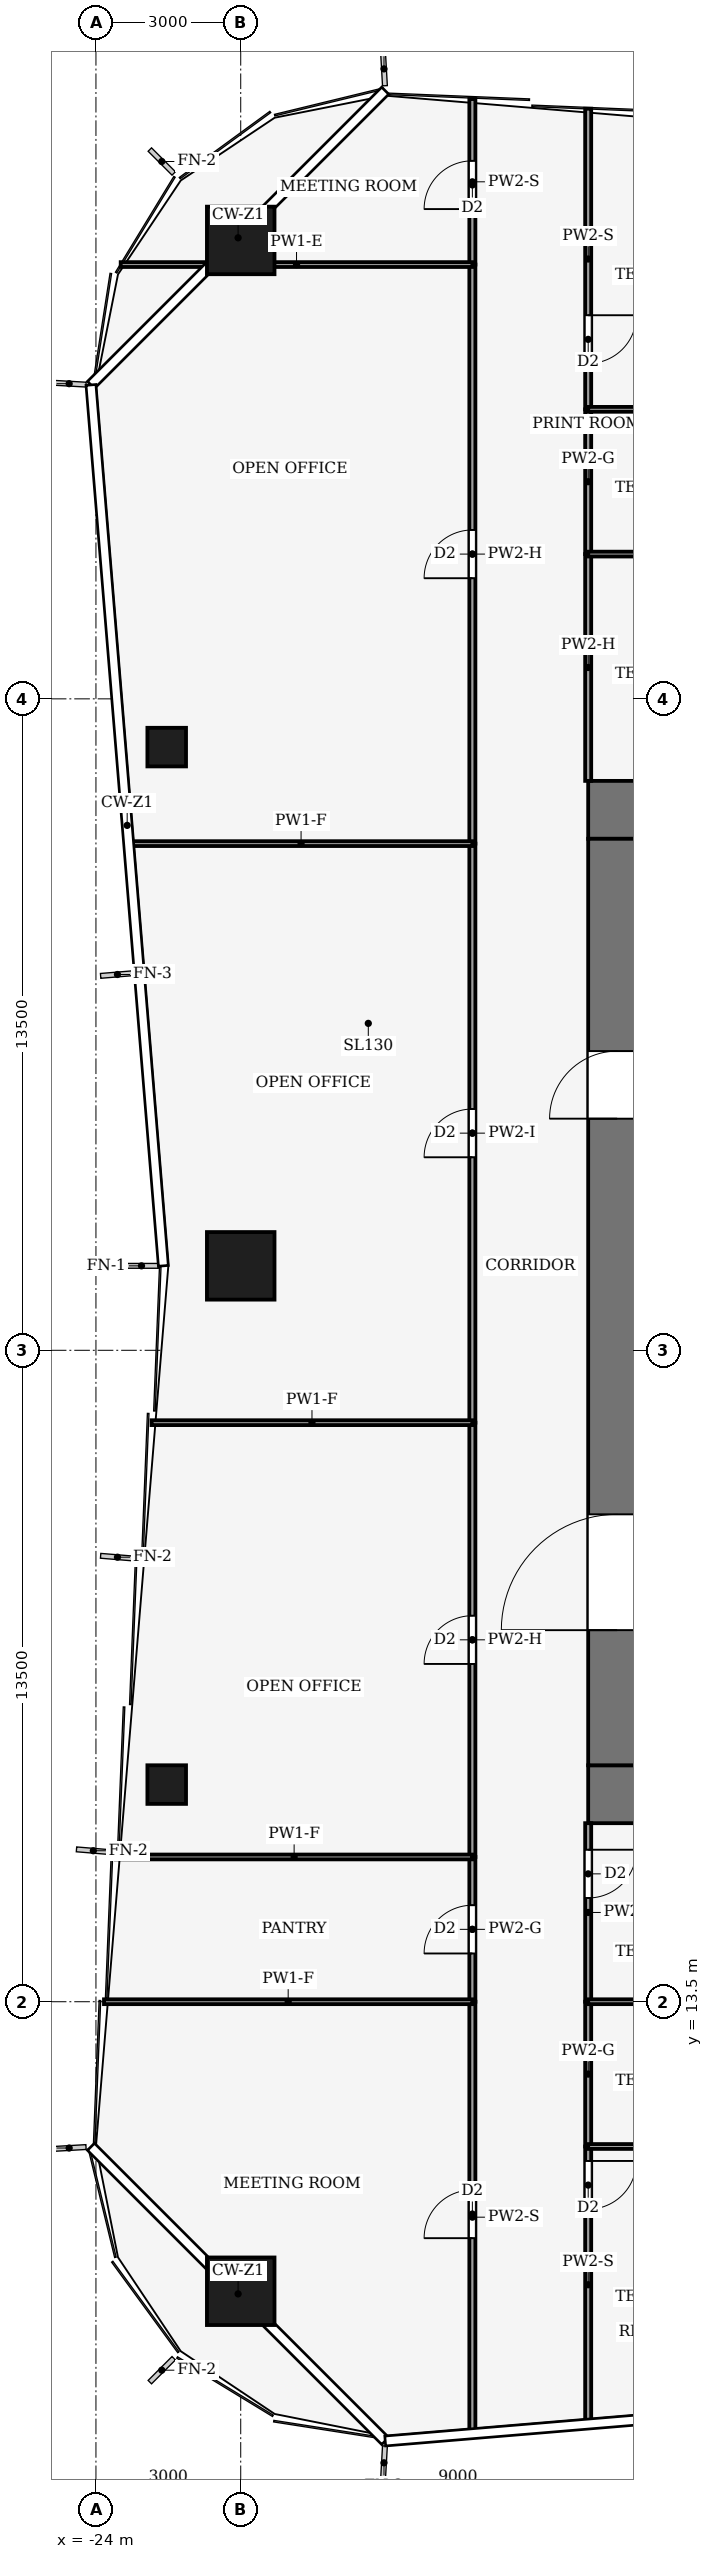
"""IFC4 building model, lengths in metres.
Left out: names, types, materials, properties, quantities, classifications, styles, units other than length and angle.
Written with IfcOpenShell. Run it as: python <this file> out.ifc"""

import sys

from ifc_helpers import new_model, si_unit, direction, frame, frame_2d, origin, origin_2d, place, context, subcontext, project, spatial, rectangle, hollow_rectangle, extrude, element, fill, save


model = new_model("IFC4")
c1 = context("Model", 3, precision=1e-05, world=origin(), true_north=direction((0.0, 1.0)))
c2 = subcontext(c1, "Body", "Model", "MODEL_VIEW")
j1 = project(units=[si_unit("LENGTHUNIT", "METRE"), si_unit("PLANEANGLEUNIT", "RADIAN")], contexts=[c1])
p1 = place(None, origin())
s1 = spatial("IfcSite", under=j1, at=p1, CompositionType="ELEMENT")
p2 = place(p1, origin())
s2 = spatial("IfcBuilding", under=s1, at=p2, CompositionType="ELEMENT")
p3 = place(p2, frame((0.0, 0.0, 82.0)))
s3 = spatial("IfcBuildingStorey", under=s2, at=p3, CompositionType="ELEMENT", Elevation=82.0)
for number, where, z_axis, x_axis in (
    (1, (-13.8, 17.8, -0.13), (0.0, 0.0, 1.0), (1.0, 0.0, 0.0)),
    (2, (-13.8, 38.2, -0.13), (0.0, 0.0, 1.0), (1.0, 0.0, 0.0)),
):
    element("IfcWall", number, at=place(p3, frame(where, z_axis=z_axis, x_axis=x_axis)), inside=s3, PredefinedType="SHEAR", context=c2, shape_type="SweptSolid", body=[
        extrude(rectangle(XDim=27.6, YDim=1.2, at=frame_2d((13.8, 0.0))), origin(), (0.0, 0.0, 1.0), 4.0),
    ])
p4 = place(p3, frame((-13.2, 18.4, -0.13), z_axis=(0.0, 0.0, 1.0), x_axis=(0.0, 1.0, 0.0)))
e3 = element("IfcWall", 3, at=p4, inside=s3, PredefinedType="SHEAR", context=c2, shape_type="SweptSolid", body=[
    extrude(rectangle(XDim=19.2, YDim=1.2, at=frame_2d((9.6, 0.0))), origin(), (0.0, 0.0, 1.0), 4.0),
])
p5 = place(p4, frame((2.8, 0.0, 0.13)))
e4 = element("IfcOpeningElement", 4, at=p5, cuts=e3, PredefinedType="OPENING", context=c2, shape_type="SweptSolid", body=[
    extrude(rectangle(XDim=2.4, YDim=2.4, at=frame_2d((1.2, 1.2))), frame((0.0, 0.61, 0.0), z_axis=(0.0, -1.0, 0.0), x_axis=(1.0, 0.0, 0.0)), (0.0, 0.0, 1.0), 1.22),
])
p6 = place(p4, frame((13.4, 0.0, 0.13)))
e5 = element("IfcOpeningElement", 5, at=p6, cuts=e3, PredefinedType="OPENING", context=c2, shape_type="SweptSolid", body=[
    extrude(rectangle(XDim=1.4, YDim=2.2, at=frame_2d((0.7, 1.1))), frame((0.0, 0.61, 0.0), z_axis=(0.0, -1.0, 0.0), x_axis=(1.0, 0.0, 0.0)), (0.0, 0.0, 1.0), 1.22),
])
for number, where, z_axis, x_axis in (
    (6, (-21.0, 50.0, 0.0), (0.0, 0.0, 1.0), (1.0, 0.0, 0.0)),
    (7, (-21.0, 7.5, 0.0), (0.0, 0.0, 1.0), (1.0, 0.0, 0.0)),
    (8, (-21.0, 28.75, 0.0), (0.0, 0.0, 1.0), (1.0, 0.0, 0.0)),
):
    element("IfcColumn", number, at=place(p3, frame(where, z_axis=z_axis, x_axis=x_axis)), inside=s3, PredefinedType="COLUMN", context=c2, shape_type="SweptSolid", body=[
        extrude(hollow_rectangle(XDim=1.4, YDim=1.4, WallThickness=0.08, at=origin_2d()), origin(), (0.0, 0.0, 1.0), 4.0),
    ])
for number, where, z_axis, x_axis in (
    (9, (-22.534, 18.0, 0.0), (0.0, 0.0, 1.0), (1.0, 0.0, 0.0)),
    (10, (-22.534, 39.5, 0.0), (0.0, 0.0, 1.0), (1.0, 0.0, 0.0)),
):
    element("IfcColumn", number, at=place(p3, frame(where, z_axis=z_axis, x_axis=x_axis)), inside=s3, PredefinedType="COLUMN", context=c2, shape_type="SweptSolid", body=[
        extrude(hollow_rectangle(XDim=0.8, YDim=0.8, WallThickness=0.04, at=origin_2d()), origin(), (0.0, 0.0, 1.0), 4.0),
    ])
p7 = place(p3, frame((-16.2, 4.57, 0.0), z_axis=(0.0, 0.0, 1.0), x_axis=(0.0, 1.0, 0.0)))
e11 = element("IfcWall", 11, at=p7, inside=s3, PredefinedType="PARTITIONING", context=c2, shape_type="SweptSolid", body=[
    extrude(rectangle(XDim=8.93, YDim=0.125, at=frame_2d((4.465, 0.0))), origin(), (0.0, 0.0, 1.0), 3.04),
])
p8 = place(p7, frame((4.03, 0.0, 0.0)))
e12 = element("IfcOpeningElement", 12, at=p8, cuts=e11, PredefinedType="OPENING", context=c2, shape_type="SweptSolid", body=[
    extrude(rectangle(XDim=1.0, YDim=2.1, at=frame_2d((0.5, 1.05))), frame((0.0, 0.073, 0.0), z_axis=(0.0, -1.0, 0.0), x_axis=(1.0, 0.0, 0.0)), (0.0, 0.0, 1.0), 0.145),
])
p9 = place(p3, frame((-16.2, 13.5, 0.0), z_axis=(0.0, 0.0, 1.0), x_axis=(0.0, 1.0, 0.0)))
e13 = element("IfcWall", 13, at=p9, inside=s3, PredefinedType="PARTITIONING", context=c2, shape_type="SweptSolid", body=[
    extrude(rectangle(XDim=3.0, YDim=0.125, at=frame_2d((1.5, 0.0))), origin(), (0.0, 0.0, 1.0), 3.87),
])
p10 = place(p9, frame((1.0, 0.0, 0.0)))
e14 = element("IfcOpeningElement", 14, at=p10, cuts=e13, PredefinedType="OPENING", context=c2, shape_type="SweptSolid", body=[
    extrude(rectangle(XDim=1.0, YDim=2.1, at=frame_2d((0.5, 1.05))), frame((0.0, 0.073, 0.0), z_axis=(0.0, -1.0, 0.0), x_axis=(1.0, 0.0, 0.0)), (0.0, 0.0, 1.0), 0.145),
])
p11 = place(p3, frame((-16.2, 16.5, 0.0), z_axis=(0.0, 0.0, 1.0), x_axis=(0.0, 1.0, 0.0)))
e15 = element("IfcWall", 15, at=p11, inside=s3, PredefinedType="PARTITIONING", context=c2, shape_type="SweptSolid", body=[
    extrude(rectangle(XDim=9.0, YDim=0.125, at=frame_2d((4.5, 0.0))), origin(), (0.0, 0.0, 1.0), 3.14),
])
p12 = place(p11, frame((4.0, 0.0, 0.0)))
e16 = element("IfcOpeningElement", 16, at=p12, cuts=e15, PredefinedType="OPENING", context=c2, shape_type="SweptSolid", body=[
    extrude(rectangle(XDim=1.0, YDim=2.1, at=frame_2d((0.5, 1.05))), frame((0.0, 0.073, 0.0), z_axis=(0.0, -1.0, 0.0), x_axis=(1.0, 0.0, 0.0)), (0.0, 0.0, 1.0), 0.145),
])
p13 = place(p3, frame((-16.2, 25.5, 0.0), z_axis=(0.0, 0.0, 1.0), x_axis=(0.0, 1.0, 0.0)))
e17 = element("IfcWall", 17, at=p13, inside=s3, PredefinedType="PARTITIONING", context=c2, shape_type="SweptSolid", body=[
    extrude(rectangle(XDim=12.0, YDim=0.125, at=frame_2d((6.0, 0.0))), origin(), (0.0, 0.0, 1.0), 3.48),
])
p14 = place(p13, frame((5.5, 0.0, 0.0)))
e18 = element("IfcOpeningElement", 18, at=p14, cuts=e17, PredefinedType="OPENING", context=c2, shape_type="SweptSolid", body=[
    extrude(rectangle(XDim=1.0, YDim=2.1, at=frame_2d((0.5, 1.05))), frame((0.0, 0.073, 0.0), z_axis=(0.0, -1.0, 0.0), x_axis=(1.0, 0.0, 0.0)), (0.0, 0.0, 1.0), 0.145),
])
p15 = place(p3, frame((-16.2, 37.5, 0.0), z_axis=(0.0, 0.0, 1.0), x_axis=(0.0, 1.0, 0.0)))
e19 = element("IfcWall", 19, at=p15, inside=s3, PredefinedType="PARTITIONING", context=c2, shape_type="SweptSolid", body=[
    extrude(rectangle(XDim=12.0, YDim=0.125, at=frame_2d((6.0, 0.0))), origin(), (0.0, 0.0, 1.0), 3.14),
])
p16 = place(p15, frame((5.5, 0.0, 0.0)))
e20 = element("IfcOpeningElement", 20, at=p16, cuts=e19, PredefinedType="OPENING", context=c2, shape_type="SweptSolid", body=[
    extrude(rectangle(XDim=1.0, YDim=2.1, at=frame_2d((0.5, 1.05))), frame((0.0, 0.073, 0.0), z_axis=(0.0, -1.0, 0.0), x_axis=(1.0, 0.0, 0.0)), (0.0, 0.0, 1.0), 0.145),
])
p17 = place(p3, frame((-16.2, 49.5, 0.0), z_axis=(0.0, 0.0, 1.0), x_axis=(0.0, 1.0, 0.0)))
e21 = element("IfcWall", 21, at=p17, inside=s3, PredefinedType="PARTITIONING", context=c2, shape_type="SweptSolid", body=[
    extrude(rectangle(XDim=3.43, YDim=0.125, at=frame_2d((1.715, 0.0))), origin(), (0.0, 0.0, 1.0), 3.04),
])
p18 = place(p17, frame((1.15, 0.0, 0.0)))
e22 = element("IfcOpeningElement", 22, at=p18, cuts=e21, PredefinedType="OPENING", context=c2, shape_type="SweptSolid", body=[
    extrude(rectangle(XDim=1.0, YDim=2.1, at=frame_2d((0.5, 1.05))), frame((0.0, 0.073, 0.0), z_axis=(0.0, -1.0, 0.0), x_axis=(1.0, 0.0, 0.0)), (0.0, 0.0, 1.0), 0.145),
])
p19 = place(p3, frame((-13.8, 10.5, 0.0), z_axis=(0.0, 0.0, 1.0), x_axis=(0.0, -1.0, 0.0)))
e23 = element("IfcWall", 23, at=p19, inside=s3, PredefinedType="PARTITIONING", context=c2, shape_type="SweptSolid", body=[
    extrude(rectangle(XDim=5.73, YDim=0.125, at=frame_2d((2.865, 0.0))), origin(), (0.0, 0.0, 1.0), 3.04),
])
p20 = place(p19, frame((0.3, 0.0, 0.0)))
e24 = element("IfcOpeningElement", 24, at=p20, cuts=e23, PredefinedType="OPENING", context=c2, shape_type="SweptSolid", body=[
    extrude(rectangle(XDim=1.0, YDim=2.1, at=frame_2d((0.5, 1.05))), frame((0.0, 0.073, 0.0), z_axis=(0.0, -1.0, 0.0), x_axis=(1.0, 0.0, 0.0)), (0.0, 0.0, 1.0), 0.145),
])
p21 = place(p3, frame((-13.8, 10.5, 0.0), z_axis=(0.0, 0.0, 1.0), x_axis=(0.0, 1.0, 0.0)))
e25 = element("IfcWall", 25, at=p21, inside=s3, PredefinedType="PARTITIONING", context=c2, shape_type="SweptSolid", body=[
    extrude(rectangle(XDim=3.0, YDim=0.125, at=frame_2d((1.5, 0.0))), origin(), (0.0, 0.0, 1.0), 3.87),
])
p22 = place(p3, frame((-13.8, 17.2, 0.0), z_axis=(0.0, 0.0, 1.0), x_axis=(0.0, -1.0, 0.0)))
e26 = element("IfcWall", 26, at=p22, inside=s3, PredefinedType="PARTITIONING", context=c2, shape_type="SweptSolid", body=[
    extrude(rectangle(XDim=3.7, YDim=0.125, at=frame_2d((1.85, 0.0))), origin(), (0.0, 0.0, 1.0), 3.14),
])
p23 = place(p22, frame((0.55, 0.0, 0.0)))
e27 = element("IfcOpeningElement", 27, at=p23, cuts=e26, PredefinedType="OPENING", context=c2, shape_type="SweptSolid", body=[
    extrude(rectangle(XDim=1.0, YDim=2.1, at=frame_2d((0.5, 1.05))), frame((0.0, 0.073, 0.0), z_axis=(0.0, -1.0, 0.0), x_axis=(1.0, 0.0, 0.0)), (0.0, 0.0, 1.0), 0.145),
])
p24 = place(p3, frame((-13.8, 38.8, 0.0), z_axis=(0.0, 0.0, 1.0), x_axis=(0.0, 1.0, 0.0)))
e28 = element("IfcWall", 28, at=p24, inside=s3, PredefinedType="PARTITIONING", context=c2, shape_type="SweptSolid", body=[
    extrude(rectangle(XDim=4.7, YDim=0.125, at=frame_2d((2.35, 0.0))), origin(), (0.0, 0.0, 1.0), 3.14),
])
p25 = place(p3, frame((-13.8, 43.5, 0.0), z_axis=(0.0, 0.0, 1.0), x_axis=(0.0, 1.0, 0.0)))
e29 = element("IfcWall", 29, at=p25, inside=s3, PredefinedType="PARTITIONING", context=c2, shape_type="SweptSolid", body=[
    extrude(rectangle(XDim=3.0, YDim=0.125, at=frame_2d((1.5, 0.0))), origin(), (0.0, 0.0, 1.0), 3.87),
])
p26 = place(p3, frame((-13.8, 52.73, 0.0), z_axis=(0.0, 0.0, 1.0), x_axis=(0.0, -1.0, 0.0)))
e30 = element("IfcWall", 30, at=p26, inside=s3, PredefinedType="PARTITIONING", context=c2, shape_type="SweptSolid", body=[
    extrude(rectangle(XDim=6.23, YDim=0.125, at=frame_2d((3.115, 0.0))), origin(), (0.0, 0.0, 1.0), 3.04),
])
p27 = place(p26, frame((4.28, 0.0, 0.0)))
e31 = element("IfcOpeningElement", 31, at=p27, cuts=e30, PredefinedType="OPENING", context=c2, shape_type="SweptSolid", body=[
    extrude(rectangle(XDim=1.0, YDim=2.1, at=frame_2d((0.5, 1.05))), frame((0.0, 0.073, 0.0), z_axis=(0.0, -1.0, 0.0), x_axis=(1.0, 0.0, 0.0)), (0.0, 0.0, 1.0), 0.145),
])
p28 = place(p3, frame((-16.2, 13.5, 0.0), z_axis=(0.0, 0.0, 1.0), x_axis=(-1.0, 0.0, 0.0)))
e32 = element("IfcWall", 32, at=p28, inside=s3, PredefinedType="PARTITIONING", context=c2, shape_type="SweptSolid", body=[
    extrude(rectangle(XDim=7.634, YDim=0.1, at=frame_2d((3.817, 0.0))), origin(), (0.0, 0.0, 1.0), 3.04),
])
p29 = place(p3, frame((-16.2, 16.5, 0.0), z_axis=(0.0, 0.0, 1.0), x_axis=(-1.0, 0.0, 0.0)))
e33 = element("IfcWall", 33, at=p29, inside=s3, PredefinedType="PARTITIONING", context=c2, shape_type="SweptSolid", body=[
    extrude(rectangle(XDim=7.387, YDim=0.1, at=frame_2d((3.693, 0.0))), origin(), (0.0, 0.0, 1.0), 3.04),
])
p30 = place(p3, frame((-16.2, 25.5, 0.0), z_axis=(0.0, 0.0, 1.0), x_axis=(-1.0, 0.0, 0.0)))
e34 = element("IfcWall", 34, at=p30, inside=s3, PredefinedType="PARTITIONING", context=c2, shape_type="SweptSolid", body=[
    extrude(rectangle(XDim=6.647, YDim=0.1, at=frame_2d((3.324, 0.0))), origin(), (0.0, 0.0, 1.0), 3.04),
])
p31 = place(p3, frame((-16.2, 37.5, 0.0), z_axis=(0.0, 0.0, 1.0), x_axis=(-1.0, 0.0, 0.0)))
e35 = element("IfcWall", 35, at=p31, inside=s3, PredefinedType="PARTITIONING", context=c2, shape_type="SweptSolid", body=[
    extrude(rectangle(XDim=7.099, YDim=0.1, at=frame_2d((3.55, 0.0))), origin(), (0.0, 0.0, 1.0), 3.04),
])
p32 = place(p3, frame((-16.2, 49.5, 0.0), z_axis=(0.0, 0.0, 1.0), x_axis=(-1.0, 0.0, 0.0)))
e36 = element("IfcWall", 36, at=p32, inside=s3, PredefinedType="PARTITIONING", context=c2, shape_type="SweptSolid", body=[
    extrude(rectangle(XDim=7.287, YDim=0.1, at=frame_2d((3.644, 0.0))), origin(), (0.0, 0.0, 1.0), 3.34),
])
p33 = place(p3, frame((-13.8, 10.5, 0.0), z_axis=(0.0, 0.0, 1.0), x_axis=(1.0, 0.0, 0.0)))
e37 = element("IfcWall", 37, at=p33, inside=s3, PredefinedType="PARTITIONING", context=c2, shape_type="SweptSolid", body=[
    extrude(rectangle(XDim=3.3, YDim=0.1, at=frame_2d((1.65, 0.0))), origin(), (0.0, 0.0, 1.0), 3.44),
])
p34 = place(p33, frame((1.95, 0.0, 0.0)))
e38 = element("IfcOpeningElement", 38, at=p34, cuts=e37, PredefinedType="OPENING", context=c2, shape_type="SweptSolid", body=[
    extrude(rectangle(XDim=1.0, YDim=2.1, at=frame_2d((0.5, 1.05))), frame((0.0, 0.06, 0.0), z_axis=(0.0, -1.0, 0.0), x_axis=(1.0, 0.0, 0.0)), (0.0, 0.0, 1.0), 0.12),
])
p35 = place(p3, frame((-10.5, 13.5, 0.0), z_axis=(0.0, 0.0, 1.0), x_axis=(-1.0, 0.0, 0.0)))
e39 = element("IfcWall", 39, at=p35, inside=s3, PredefinedType="PARTITIONING", context=c2, shape_type="SweptSolid", body=[
    extrude(rectangle(XDim=3.3, YDim=0.1, at=frame_2d((1.65, 0.0))), origin(), (0.0, 0.0, 1.0), 3.44),
])
p36 = place(p3, frame((-10.5, 43.5, 0.0), z_axis=(0.0, 0.0, 1.0), x_axis=(-1.0, 0.0, 0.0)))
e40 = element("IfcWall", 40, at=p36, inside=s3, PredefinedType="PARTITIONING", context=c2, shape_type="SweptSolid", body=[
    extrude(rectangle(XDim=3.3, YDim=0.1, at=frame_2d((1.65, 0.0))), origin(), (0.0, 0.0, 1.0), 3.39),
])
p37 = place(p36, frame((1.15, 0.0, 0.0)))
e41 = element("IfcOpeningElement", 41, at=p37, cuts=e40, PredefinedType="OPENING", context=c2, shape_type="SweptSolid", body=[
    extrude(rectangle(XDim=1.0, YDim=2.1, at=frame_2d((0.5, 1.05))), frame((0.0, 0.06, 0.0), z_axis=(0.0, -1.0, 0.0), x_axis=(1.0, 0.0, 0.0)), (0.0, 0.0, 1.0), 0.12),
])
p38 = place(p3, frame((-10.5, 46.5, 0.0), z_axis=(0.0, 0.0, 1.0), x_axis=(-1.0, 0.0, 0.0)))
e42 = element("IfcWall", 42, at=p38, inside=s3, PredefinedType="PARTITIONING", context=c2, shape_type="SweptSolid", body=[
    extrude(rectangle(XDim=3.3, YDim=0.1, at=frame_2d((1.65, 0.0))), origin(), (0.0, 0.0, 1.0), 3.39),
])
p39 = place(p38, frame((0.35, 0.0, 0.0)))
e43 = element("IfcOpeningElement", 43, at=p39, cuts=e42, PredefinedType="OPENING", context=c2, shape_type="SweptSolid", body=[
    extrude(rectangle(XDim=1.0, YDim=2.1, at=frame_2d((0.5, 1.05))), frame((0.0, 0.06, 0.0), z_axis=(0.0, -1.0, 0.0), x_axis=(1.0, 0.0, 0.0)), (0.0, 0.0, 1.0), 0.12),
])
p40 = place(p5, origin())
e44 = element("IfcDoor", 44, at=p40, inside=s3, OperationType="DOUBLE_DOOR_SINGLE_SWING", PredefinedType="DOOR", context=c2, shape_type="SweptSolid", body=[
    extrude(rectangle(XDim=2.4, YDim=2.4, at=frame_2d((1.2, 1.2))), frame((0.0, 0.025, 0.0), z_axis=(0.0, -1.0, 0.0), x_axis=(1.0, 0.0, 0.0)), (0.0, 0.0, 1.0), 0.05),
])
fill(e4, e44)
p41 = place(p6, origin())
e45 = element("IfcDoor", 45, at=p41, inside=s3, OperationType="SINGLE_SWING_RIGHT", PredefinedType="DOOR", context=c2, shape_type="SweptSolid", body=[
    extrude(rectangle(XDim=1.4, YDim=2.2, at=frame_2d((0.7, 1.1))), frame((0.0, 0.025, 0.0), z_axis=(0.0, -1.0, 0.0), x_axis=(1.0, 0.0, 0.0)), (0.0, 0.0, 1.0), 0.05),
])
fill(e5, e45)
p42 = place(p8, origin())
e46 = element("IfcDoor", 46, at=p42, inside=s3, OperationType="SINGLE_SWING_RIGHT", PredefinedType="DOOR", context=c2, shape_type="SweptSolid", body=[
    extrude(rectangle(XDim=1.0, YDim=2.1, at=frame_2d((0.5, 1.05))), frame((0.0, 0.025, 0.0), z_axis=(0.0, -1.0, 0.0), x_axis=(1.0, 0.0, 0.0)), (0.0, 0.0, 1.0), 0.05),
])
fill(e12, e46)
p43 = place(p10, origin())
e47 = element("IfcDoor", 47, at=p43, inside=s3, OperationType="SINGLE_SWING_RIGHT", PredefinedType="DOOR", context=c2, shape_type="SweptSolid", body=[
    extrude(rectangle(XDim=1.0, YDim=2.1, at=frame_2d((0.5, 1.05))), frame((0.0, 0.025, 0.0), z_axis=(0.0, -1.0, 0.0), x_axis=(1.0, 0.0, 0.0)), (0.0, 0.0, 1.0), 0.05),
])
fill(e14, e47)
p44 = place(p12, origin())
e48 = element("IfcDoor", 48, at=p44, inside=s3, OperationType="SINGLE_SWING_LEFT", PredefinedType="DOOR", context=c2, shape_type="SweptSolid", body=[
    extrude(rectangle(XDim=1.0, YDim=2.1, at=frame_2d((0.5, 1.05))), frame((0.0, 0.025, 0.0), z_axis=(0.0, -1.0, 0.0), x_axis=(1.0, 0.0, 0.0)), (0.0, 0.0, 1.0), 0.05),
])
fill(e16, e48)
p45 = place(p14, origin())
e49 = element("IfcDoor", 49, at=p45, inside=s3, OperationType="SINGLE_SWING_RIGHT", PredefinedType="DOOR", context=c2, shape_type="SweptSolid", body=[
    extrude(rectangle(XDim=1.0, YDim=2.1, at=frame_2d((0.5, 1.05))), frame((0.0, 0.025, 0.0), z_axis=(0.0, -1.0, 0.0), x_axis=(1.0, 0.0, 0.0)), (0.0, 0.0, 1.0), 0.05),
])
fill(e18, e49)
p46 = place(p16, origin())
e50 = element("IfcDoor", 50, at=p46, inside=s3, OperationType="SINGLE_SWING_LEFT", PredefinedType="DOOR", context=c2, shape_type="SweptSolid", body=[
    extrude(rectangle(XDim=1.0, YDim=2.1, at=frame_2d((0.5, 1.05))), frame((0.0, 0.025, 0.0), z_axis=(0.0, -1.0, 0.0), x_axis=(1.0, 0.0, 0.0)), (0.0, 0.0, 1.0), 0.05),
])
fill(e20, e50)
p47 = place(p18, origin())
e51 = element("IfcDoor", 51, at=p47, inside=s3, OperationType="SINGLE_SWING_LEFT", PredefinedType="DOOR", context=c2, shape_type="SweptSolid", body=[
    extrude(rectangle(XDim=1.0, YDim=2.1, at=frame_2d((0.5, 1.05))), frame((0.0, 0.025, 0.0), z_axis=(0.0, -1.0, 0.0), x_axis=(1.0, 0.0, 0.0)), (0.0, 0.0, 1.0), 0.05),
])
fill(e22, e51)
p48 = place(p20, origin())
e52 = element("IfcDoor", 52, at=p48, inside=s3, OperationType="SINGLE_SWING_LEFT", PredefinedType="DOOR", context=c2, shape_type="SweptSolid", body=[
    extrude(rectangle(XDim=1.0, YDim=2.1, at=frame_2d((0.5, 1.05))), frame((0.0, 0.025, 0.0), z_axis=(0.0, -1.0, 0.0), x_axis=(1.0, 0.0, 0.0)), (0.0, 0.0, 1.0), 0.05),
])
fill(e24, e52)
p49 = place(p23, origin())
e53 = element("IfcDoor", 53, at=p49, inside=s3, OperationType="SINGLE_SWING_LEFT", PredefinedType="DOOR", context=c2, shape_type="SweptSolid", body=[
    extrude(rectangle(XDim=1.0, YDim=2.1, at=frame_2d((0.5, 1.05))), frame((0.0, 0.025, 0.0), z_axis=(0.0, -1.0, 0.0), x_axis=(1.0, 0.0, 0.0)), (0.0, 0.0, 1.0), 0.05),
])
fill(e27, e53)
p50 = place(p27, origin())
e54 = element("IfcDoor", 54, at=p50, inside=s3, OperationType="SINGLE_SWING_RIGHT", PredefinedType="DOOR", context=c2, shape_type="SweptSolid", body=[
    extrude(rectangle(XDim=1.0, YDim=2.1, at=frame_2d((0.5, 1.05))), frame((0.0, 0.025, 0.0), z_axis=(0.0, -1.0, 0.0), x_axis=(1.0, 0.0, 0.0)), (0.0, 0.0, 1.0), 0.05),
])
fill(e31, e54)
save(model, sys.argv[1])
